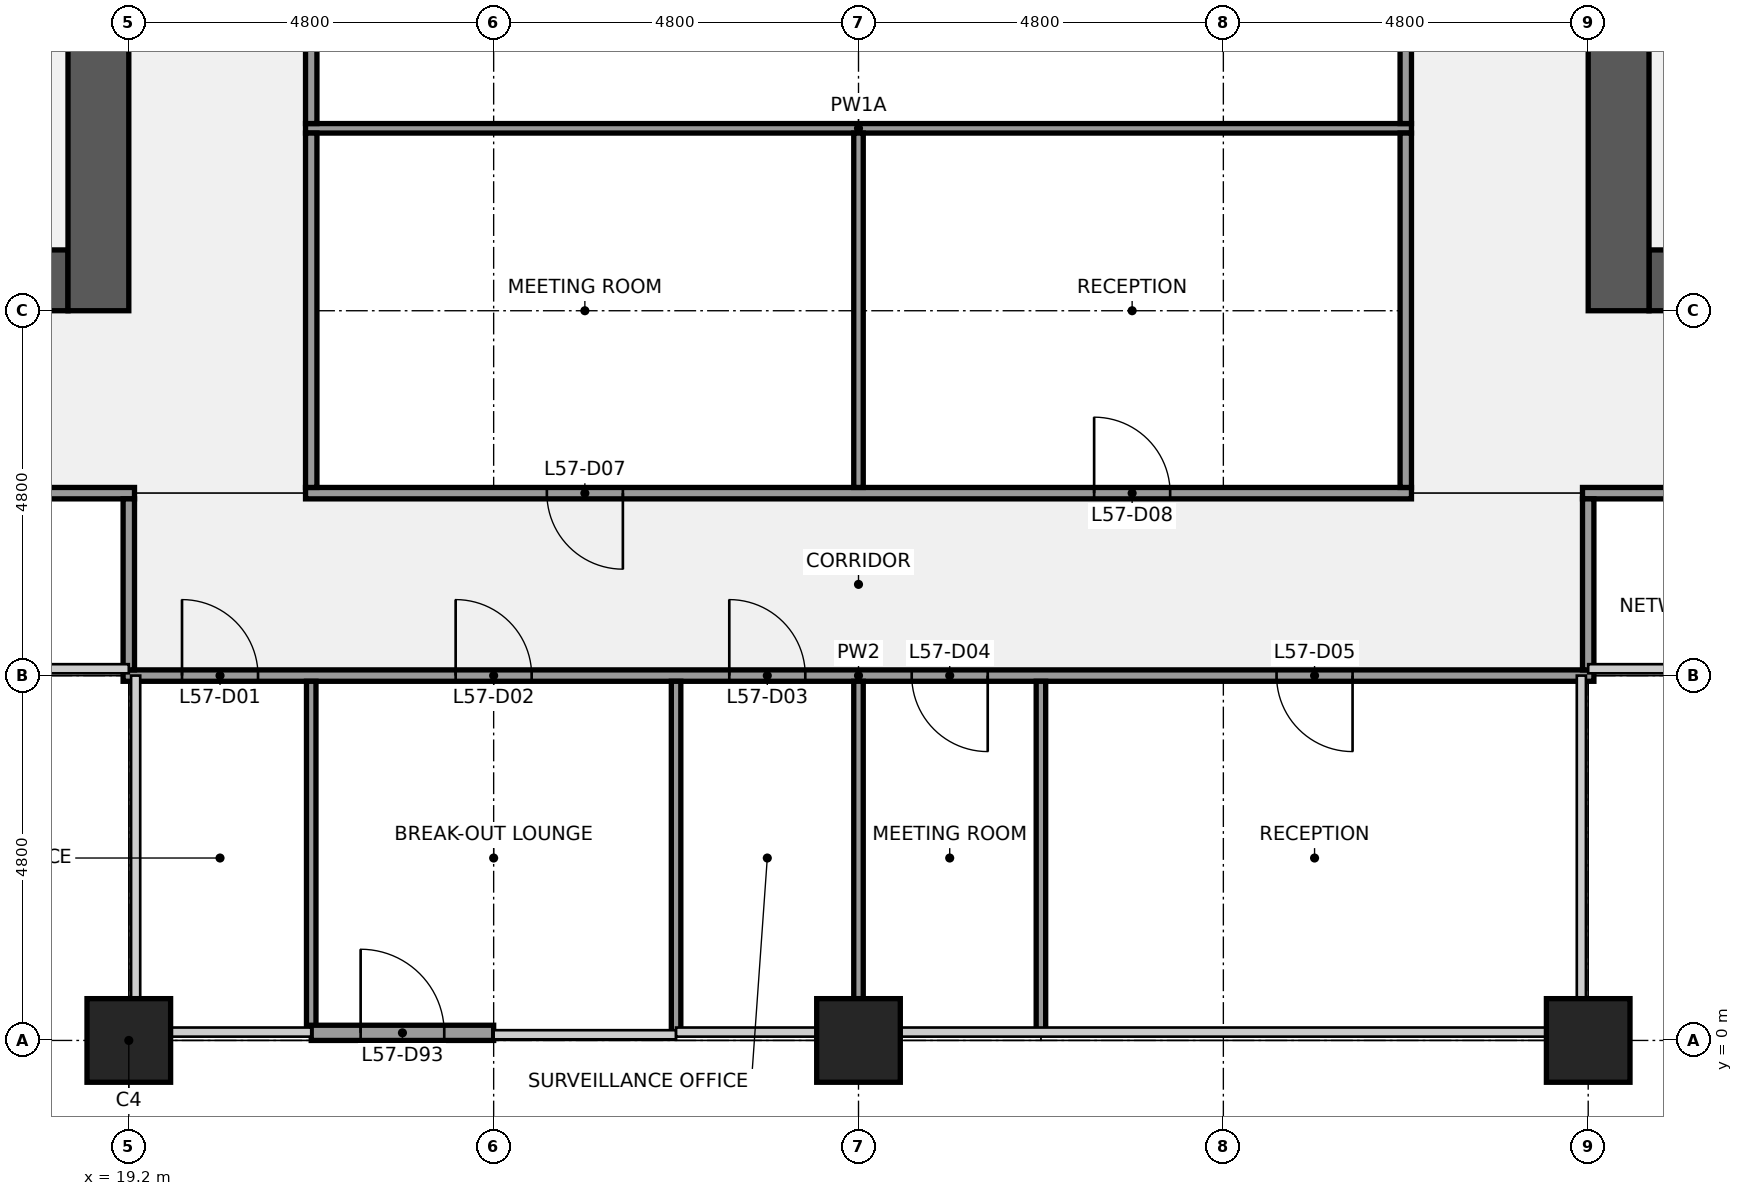
"""IFC4 building model, lengths in metres.
Left out: names, types, materials, properties, quantities, classifications, styles, units other than length and angle.
Written with IfcOpenShell. Run it as: python <this file> out.ifc"""

import sys

from ifc_helpers import new_model, si_unit, direction, frame, frame_2d, origin, origin_2d, place, context, subcontext, project, spatial, rectangle, extrude, element, fill, save


model = new_model("IFC4")
c1 = context("Model", 3, precision=1e-05, world=origin(), true_north=direction((0.0, 1.0)))
c2 = subcontext(c1, "Body", "Model", "MODEL_VIEW")
j1 = project(units=[si_unit("LENGTHUNIT", "METRE"), si_unit("PLANEANGLEUNIT", "RADIAN")], contexts=[c1])
p1 = place(None, origin())
s1 = spatial("IfcSite", under=j1, at=p1, CompositionType="ELEMENT")
p2 = place(p1, origin())
s2 = spatial("IfcBuilding", under=s1, at=p2, CompositionType="ELEMENT")
p3 = place(p2, frame((0.0, 0.0, 257.2)))
s3 = spatial("IfcBuildingStorey", under=s2, at=p3, CompositionType="ELEMENT", Elevation=257.2)
for number, where, z_axis, x_axis in (
    (1, (19.2, 0.0, 0.0), (0.0, 0.0, 1.0), (1.0, 0.0, 0.0)),
    (2, (28.8, 0.0, 0.0), (0.0, 0.0, 1.0), (1.0, 0.0, 0.0)),
    (3, (38.4, 0.0, 0.0), (0.0, 0.0, 1.0), (1.0, 0.0, 0.0)),
):
    element("IfcColumn", number, at=place(p3, frame(where, z_axis=z_axis, x_axis=x_axis)), inside=s3, PredefinedType="COLUMN", context=c2, shape_type="SweptSolid", body=[
        extrude(rectangle(XDim=1.1, YDim=1.1, at=origin_2d()), origin(), (0.0, 0.0, 1.0), 4.0),
    ])
p4 = place(p3, frame((18.4, 10.0, 0.0), z_axis=(0.0, 0.0, 1.0), x_axis=(-1.0, 0.0, 0.0)))
e4 = element("IfcWall", 4, at=p4, inside=s3, PredefinedType="SHEAR", context=c2, shape_type="SweptSolid", body=[
    extrude(rectangle(XDim=4.0, YDim=0.8, at=frame_2d((2.0, 0.0))), origin(), (0.0, 0.0, 1.0), 3.84),
])
p5 = place(p4, frame((1.05, 0.0, 0.0)))
e5 = element("IfcOpeningElement", 5, at=p5, cuts=e4, PredefinedType="OPENING", context=c2, shape_type="SweptSolid", body=[
    extrude(rectangle(XDim=1.1, YDim=2.1, at=frame_2d((0.55, 1.05))), frame((0.0, 0.41, 0.0), z_axis=(0.0, -1.0, 0.0), x_axis=(1.0, 0.0, 0.0)), (0.0, 0.0, 1.0), 0.82),
])
p6 = place(p3, frame((18.8, 38.4, 0.0), z_axis=(0.0, 0.0, 1.0), x_axis=(0.0, -1.0, 0.0)))
e6 = element("IfcWall", 6, at=p6, inside=s3, PredefinedType="SHEAR", context=c2, shape_type="SweptSolid", body=[
    extrude(rectangle(XDim=28.8, YDim=0.8, at=frame_2d((14.4, 0.0))), origin(), (0.0, 0.0, 1.0), 3.84),
])
p7 = place(p6, frame((18.3, 0.0, 0.0)))
e7 = element("IfcOpeningElement", 7, at=p7, cuts=e6, PredefinedType="OPENING", context=c2, shape_type="SweptSolid", body=[
    extrude(rectangle(XDim=1.8, YDim=2.1, at=frame_2d((0.9, 1.05))), frame((0.0, 0.41, 0.0), z_axis=(0.0, -1.0, 0.0), x_axis=(1.0, 0.0, 0.0)), (0.0, 0.0, 1.0), 0.82),
])
p8 = place(p6, frame((8.7, 0.0, 0.0)))
e8 = element("IfcOpeningElement", 8, at=p8, cuts=e6, PredefinedType="OPENING", context=c2, shape_type="SweptSolid", body=[
    extrude(rectangle(XDim=1.8, YDim=2.1, at=frame_2d((0.9, 1.05))), frame((0.0, 0.41, 0.0), z_axis=(0.0, -1.0, 0.0), x_axis=(1.0, 0.0, 0.0)), (0.0, 0.0, 1.0), 0.82),
])
p9 = place(p3, frame((43.2, 10.0, 0.0), z_axis=(0.0, 0.0, 1.0), x_axis=(-1.0, 0.0, 0.0)))
e9 = element("IfcWall", 9, at=p9, inside=s3, PredefinedType="SHEAR", context=c2, shape_type="SweptSolid", body=[
    extrude(rectangle(XDim=4.0, YDim=0.8, at=frame_2d((2.0, 0.0))), origin(), (0.0, 0.0, 1.0), 3.84),
])
p10 = place(p9, frame((1.85, 0.0, 0.0)))
e10 = element("IfcOpeningElement", 10, at=p10, cuts=e9, PredefinedType="OPENING", context=c2, shape_type="SweptSolid", body=[
    extrude(rectangle(XDim=1.1, YDim=2.1, at=frame_2d((0.55, 1.05))), frame((0.0, 0.41, 0.0), z_axis=(0.0, -1.0, 0.0), x_axis=(1.0, 0.0, 0.0)), (0.0, 0.0, 1.0), 0.82),
])
p11 = place(p3, frame((38.8, 9.6, 0.0), z_axis=(0.0, 0.0, 1.0), x_axis=(0.0, 1.0, 0.0)))
e11 = element("IfcWall", 11, at=p11, inside=s3, PredefinedType="SHEAR", context=c2, shape_type="SweptSolid", body=[
    extrude(rectangle(XDim=28.8, YDim=0.8, at=frame_2d((14.4, 0.0))), origin(), (0.0, 0.0, 1.0), 3.84),
])
p12 = place(p11, frame((8.7, 0.0, 0.0)))
e12 = element("IfcOpeningElement", 12, at=p12, cuts=e11, PredefinedType="OPENING", context=c2, shape_type="SweptSolid", body=[
    extrude(rectangle(XDim=1.8, YDim=2.1, at=frame_2d((0.9, 1.05))), frame((0.0, 0.41, 0.0), z_axis=(0.0, -1.0, 0.0), x_axis=(1.0, 0.0, 0.0)), (0.0, 0.0, 1.0), 0.82),
])
p13 = place(p11, frame((18.3, 0.0, 0.0)))
e13 = element("IfcOpeningElement", 13, at=p13, cuts=e11, PredefinedType="OPENING", context=c2, shape_type="SweptSolid", body=[
    extrude(rectangle(XDim=1.8, YDim=2.1, at=frame_2d((0.9, 1.05))), frame((0.0, 0.41, 0.0), z_axis=(0.0, -1.0, 0.0), x_axis=(1.0, 0.0, 0.0)), (0.0, 0.0, 1.0), 0.82),
])
p14 = place(p3, frame((19.125, 4.8, 0.0), z_axis=(0.0, 0.0, 1.0), x_axis=(1.0, 0.0, 0.0)))
e14 = element("IfcWall", 14, at=p14, inside=s3, PredefinedType="PARTITIONING", context=c2, shape_type="SweptSolid", body=[
    extrude(rectangle(XDim=19.35, YDim=0.15, at=frame_2d((9.675, 0.0))), origin(), (0.0, 0.0, 1.0), 2.87),
])
p15 = place(p14, frame((0.775, 0.0, 0.0)))
e15 = element("IfcOpeningElement", 15, at=p15, cuts=e14, PredefinedType="OPENING", context=c2, shape_type="SweptSolid", body=[
    extrude(rectangle(XDim=1.0, YDim=2.1, at=frame_2d((0.5, 1.05))), frame((0.0, 0.085, 0.0), z_axis=(0.0, -1.0, 0.0), x_axis=(1.0, 0.0, 0.0)), (0.0, 0.0, 1.0), 0.17),
])
p16 = place(p14, frame((4.375, 0.0, 0.0)))
e16 = element("IfcOpeningElement", 16, at=p16, cuts=e14, PredefinedType="OPENING", context=c2, shape_type="SweptSolid", body=[
    extrude(rectangle(XDim=1.0, YDim=2.1, at=frame_2d((0.5, 1.05))), frame((0.0, 0.085, 0.0), z_axis=(0.0, -1.0, 0.0), x_axis=(1.0, 0.0, 0.0)), (0.0, 0.0, 1.0), 0.17),
])
p17 = place(p14, frame((7.975, 0.0, 0.0)))
e17 = element("IfcOpeningElement", 17, at=p17, cuts=e14, PredefinedType="OPENING", context=c2, shape_type="SweptSolid", body=[
    extrude(rectangle(XDim=1.0, YDim=2.1, at=frame_2d((0.5, 1.05))), frame((0.0, 0.085, 0.0), z_axis=(0.0, -1.0, 0.0), x_axis=(1.0, 0.0, 0.0)), (0.0, 0.0, 1.0), 0.17),
])
p18 = place(p14, frame((10.375, 0.0, 0.0)))
e18 = element("IfcOpeningElement", 18, at=p18, cuts=e14, PredefinedType="OPENING", context=c2, shape_type="SweptSolid", body=[
    extrude(rectangle(XDim=1.0, YDim=2.1, at=frame_2d((0.5, 1.05))), frame((0.0, 0.085, 0.0), z_axis=(0.0, -1.0, 0.0), x_axis=(1.0, 0.0, 0.0)), (0.0, 0.0, 1.0), 0.17),
])
p19 = place(p14, frame((15.175, 0.0, 0.0)))
e19 = element("IfcOpeningElement", 19, at=p19, cuts=e14, PredefinedType="OPENING", context=c2, shape_type="SweptSolid", body=[
    extrude(rectangle(XDim=1.0, YDim=2.1, at=frame_2d((0.5, 1.05))), frame((0.0, 0.085, 0.0), z_axis=(0.0, -1.0, 0.0), x_axis=(1.0, 0.0, 0.0)), (0.0, 0.0, 1.0), 0.17),
])
p20 = place(p3, frame((14.5, 7.2, 0.0), z_axis=(0.0, 0.0, 1.0), x_axis=(1.0, 0.0, 0.0)))
e20 = element("IfcWall", 20, at=p20, inside=s3, PredefinedType="PARTITIONING", context=c2, shape_type="SweptSolid", body=[
    extrude(rectangle(XDim=4.775, YDim=0.15, at=frame_2d((2.387, 0.0))), origin(), (0.0, 0.0, 1.0), 2.87),
])
p21 = place(p20, frame((1.85, 0.0, 0.0)))
e21 = element("IfcOpeningElement", 21, at=p21, cuts=e20, PredefinedType="OPENING", context=c2, shape_type="SweptSolid", body=[
    extrude(rectangle(XDim=1.0, YDim=2.1, at=frame_2d((0.5, 1.05))), frame((0.0, 0.085, 0.0), z_axis=(0.0, -1.0, 0.0), x_axis=(1.0, 0.0, 0.0)), (0.0, 0.0, 1.0), 0.17),
])
p22 = place(p3, frame((21.525, 7.2, 0.0), z_axis=(0.0, 0.0, 1.0), x_axis=(1.0, 0.0, 0.0)))
e22 = element("IfcWall", 22, at=p22, inside=s3, PredefinedType="PARTITIONING", context=c2, shape_type="SweptSolid", body=[
    extrude(rectangle(XDim=14.55, YDim=0.15, at=frame_2d((7.275, 0.0))), origin(), (0.0, 0.0, 1.0), 2.87),
])
p23 = place(p22, frame((3.175, 0.0, 0.0)))
e23 = element("IfcOpeningElement", 23, at=p23, cuts=e22, PredefinedType="OPENING", context=c2, shape_type="SweptSolid", body=[
    extrude(rectangle(XDim=1.0, YDim=2.1, at=frame_2d((0.5, 1.05))), frame((0.0, 0.085, 0.0), z_axis=(0.0, -1.0, 0.0), x_axis=(1.0, 0.0, 0.0)), (0.0, 0.0, 1.0), 0.17),
])
p24 = place(p22, frame((10.375, 0.0, 0.0)))
e24 = element("IfcOpeningElement", 24, at=p24, cuts=e22, PredefinedType="OPENING", context=c2, shape_type="SweptSolid", body=[
    extrude(rectangle(XDim=1.0, YDim=2.1, at=frame_2d((0.5, 1.05))), frame((0.0, 0.085, 0.0), z_axis=(0.0, -1.0, 0.0), x_axis=(1.0, 0.0, 0.0)), (0.0, 0.0, 1.0), 0.17),
])
p25 = place(p3, frame((38.325, 7.2, 0.0), z_axis=(0.0, 0.0, 1.0), x_axis=(1.0, 0.0, 0.0)))
e25 = element("IfcWall", 25, at=p25, inside=s3, PredefinedType="PARTITIONING", context=c2, shape_type="SweptSolid", body=[
    extrude(rectangle(XDim=4.775, YDim=0.15, at=frame_2d((2.388, 0.0))), origin(), (0.0, 0.0, 1.0), 2.87),
])
p26 = place(p25, frame((1.925, 0.0, 0.0)))
e26 = element("IfcOpeningElement", 26, at=p26, cuts=e25, PredefinedType="OPENING", context=c2, shape_type="SweptSolid", body=[
    extrude(rectangle(XDim=1.0, YDim=2.1, at=frame_2d((0.5, 1.05))), frame((0.0, 0.085, 0.0), z_axis=(0.0, -1.0, 0.0), x_axis=(1.0, 0.0, 0.0)), (0.0, 0.0, 1.0), 0.17),
])
p27 = place(p3, frame((21.525, 12.0, 0.0), z_axis=(0.0, 0.0, 1.0), x_axis=(1.0, 0.0, 0.0)))
e27 = element("IfcWall", 27, at=p27, inside=s3, PredefinedType="PARTITIONING", context=c2, shape_type="SweptSolid", body=[
    extrude(rectangle(XDim=14.55, YDim=0.125, at=frame_2d((7.275, 0.0))), origin(), (0.0, 0.0, 1.0), 2.87),
])
p28 = place(p3, frame((19.2, 4.875, 0.0), z_axis=(0.0, 0.0, 1.0), x_axis=(0.0, 1.0, 0.0)))
e28 = element("IfcWall", 28, at=p28, inside=s3, PredefinedType="PARTITIONING", context=c2, shape_type="SweptSolid", body=[
    extrude(rectangle(XDim=2.25, YDim=0.15, at=frame_2d((1.125, 0.0))), origin(), (0.0, 0.0, 1.0), 2.87),
])
p29 = place(p3, frame((21.6, 0.1, 0.0), z_axis=(0.0, 0.0, 1.0), x_axis=(0.0, 1.0, 0.0)))
e29 = element("IfcWall", 29, at=p29, inside=s3, PredefinedType="PARTITIONING", context=c2, shape_type="SweptSolid", body=[
    extrude(rectangle(XDim=4.625, YDim=0.125, at=frame_2d((2.312, 0.0))), origin(), (0.0, 0.0, 1.0), 2.87),
])
p30 = place(p3, frame((21.6, 7.275, 0.0), z_axis=(0.0, 0.0, 1.0), x_axis=(0.0, 1.0, 0.0)))
e30 = element("IfcWall", 30, at=p30, inside=s3, PredefinedType="PARTITIONING", context=c2, shape_type="SweptSolid", body=[
    extrude(rectangle(XDim=4.663, YDim=0.15, at=frame_2d((2.331, 0.0))), origin(), (0.0, 0.0, 1.0), 2.87),
])
p31 = place(p3, frame((21.6, 12.062, 0.0), z_axis=(0.0, 0.0, 1.0), x_axis=(0.0, 1.0, 0.0)))
e31 = element("IfcWall", 31, at=p31, inside=s3, PredefinedType="PARTITIONING", context=c2, shape_type="SweptSolid", body=[
    extrude(rectangle(XDim=7.075, YDim=0.15, at=frame_2d((3.538, 0.0))), origin(), (0.0, 0.0, 1.0), 2.87),
])
p32 = place(p31, frame((3.038, 0.0, 0.0)))
e32 = element("IfcOpeningElement", 32, at=p32, cuts=e31, PredefinedType="OPENING", context=c2, shape_type="SweptSolid", body=[
    extrude(rectangle(XDim=1.0, YDim=2.1, at=frame_2d((0.5, 1.05))), frame((0.0, 0.085, 0.0), z_axis=(0.0, -1.0, 0.0), x_axis=(1.0, 0.0, 0.0)), (0.0, 0.0, 1.0), 0.17),
])
p33 = place(p3, frame((26.4, 0.1, 0.0), z_axis=(0.0, 0.0, 1.0), x_axis=(0.0, 1.0, 0.0)))
e33 = element("IfcWall", 33, at=p33, inside=s3, PredefinedType="PARTITIONING", context=c2, shape_type="SweptSolid", body=[
    extrude(rectangle(XDim=4.625, YDim=0.125, at=frame_2d((2.312, 0.0))), origin(), (0.0, 0.0, 1.0), 2.87),
])
p34 = place(p3, frame((28.8, 0.55, 0.0), z_axis=(0.0, 0.0, 1.0), x_axis=(0.0, 1.0, 0.0)))
e34 = element("IfcWall", 34, at=p34, inside=s3, PredefinedType="PARTITIONING", context=c2, shape_type="SweptSolid", body=[
    extrude(rectangle(XDim=4.175, YDim=0.125, at=frame_2d((2.087, 0.0))), origin(), (0.0, 0.0, 1.0), 2.87),
])
p35 = place(p3, frame((28.8, 7.275, 0.0), z_axis=(0.0, 0.0, 1.0), x_axis=(0.0, 1.0, 0.0)))
e35 = element("IfcWall", 35, at=p35, inside=s3, PredefinedType="PARTITIONING", context=c2, shape_type="SweptSolid", body=[
    extrude(rectangle(XDim=4.663, YDim=0.125, at=frame_2d((2.331, 0.0))), origin(), (0.0, 0.0, 1.0), 2.87),
])
p36 = place(p3, frame((31.2, 0.1, 0.0), z_axis=(0.0, 0.0, 1.0), x_axis=(0.0, 1.0, 0.0)))
e36 = element("IfcWall", 36, at=p36, inside=s3, PredefinedType="PARTITIONING", context=c2, shape_type="SweptSolid", body=[
    extrude(rectangle(XDim=4.625, YDim=0.125, at=frame_2d((2.312, 0.0))), origin(), (0.0, 0.0, 1.0), 2.87),
])
p37 = place(p3, frame((36.0, 7.275, 0.0), z_axis=(0.0, 0.0, 1.0), x_axis=(0.0, 1.0, 0.0)))
e37 = element("IfcWall", 37, at=p37, inside=s3, PredefinedType="PARTITIONING", context=c2, shape_type="SweptSolid", body=[
    extrude(rectangle(XDim=4.663, YDim=0.15, at=frame_2d((2.331, 0.0))), origin(), (0.0, 0.0, 1.0), 2.87),
])
p38 = place(p3, frame((36.0, 12.062, 0.0), z_axis=(0.0, 0.0, 1.0), x_axis=(0.0, 1.0, 0.0)))
e38 = element("IfcWall", 38, at=p38, inside=s3, PredefinedType="PARTITIONING", context=c2, shape_type="SweptSolid", body=[
    extrude(rectangle(XDim=7.075, YDim=0.15, at=frame_2d((3.538, 0.0))), origin(), (0.0, 0.0, 1.0), 2.87),
])
p39 = place(p3, frame((38.4, 4.875, 0.0), z_axis=(0.0, 0.0, 1.0), x_axis=(0.0, 1.0, 0.0)))
e39 = element("IfcWall", 39, at=p39, inside=s3, PredefinedType="PARTITIONING", context=c2, shape_type="SweptSolid", body=[
    extrude(rectangle(XDim=2.25, YDim=0.15, at=frame_2d((1.125, 0.0))), origin(), (0.0, 0.0, 1.0), 2.87),
])
p40 = place(p3, frame((21.6, 0.1, 0.0), z_axis=(0.0, 0.0, 1.0), x_axis=(1.0, 0.0, 0.0)))
e40 = element("IfcWall", 40, at=p40, inside=s3, PredefinedType="SOLIDWALL", context=c2, shape_type="SweptSolid", body=[
    extrude(rectangle(XDim=2.4, YDim=0.2, at=frame_2d((1.2, 0.0))), origin(), (0.0, 0.0, 1.0), 3.314),
])
p41 = place(p40, frame((0.65, 0.0, 0.0)))
e41 = element("IfcOpeningElement", 41, at=p41, cuts=e40, PredefinedType="OPENING", context=c2, shape_type="SweptSolid", body=[
    extrude(rectangle(XDim=1.1, YDim=2.1, at=frame_2d((0.55, 1.05))), frame((0.0, 0.11, 0.0), z_axis=(0.0, -1.0, 0.0), x_axis=(1.0, 0.0, 0.0)), (0.0, 0.0, 1.0), 0.22),
])
for number, where, z_axis, x_axis in (
    (42, (19.2, -1.025, 0.0), (0.0, 0.0, 1.0), (1.0, 0.0, 0.0)),
    (43, (38.4, -1.025, 0.0), (0.0, 0.0, 1.0), (1.0, 0.0, 0.0)),
):
    element("IfcColumn", number, at=place(p3, frame(where, z_axis=z_axis, x_axis=x_axis)), inside=s3, PredefinedType="PILASTER", context=c2, shape_type="SweptSolid", body=[
        extrude(rectangle(XDim=2.4, YDim=0.95, at=origin_2d()), origin(), (0.0, 0.0, 1.0), 4.0),
    ])
p42 = place(p15, origin())
e44 = element("IfcDoor", 44, at=p42, inside=s3, OperationType="SINGLE_SWING_LEFT", PredefinedType="DOOR", context=c2, shape_type="SweptSolid", body=[
    extrude(rectangle(XDim=1.0, YDim=2.1, at=frame_2d((0.5, 1.05))), frame((0.0, 0.025, 0.0), z_axis=(0.0, -1.0, 0.0), x_axis=(1.0, 0.0, 0.0)), (0.0, 0.0, 1.0), 0.05),
])
fill(e15, e44)
p43 = place(p16, origin())
e45 = element("IfcDoor", 45, at=p43, inside=s3, OperationType="SINGLE_SWING_LEFT", PredefinedType="DOOR", context=c2, shape_type="SweptSolid", body=[
    extrude(rectangle(XDim=1.0, YDim=2.1, at=frame_2d((0.5, 1.05))), frame((0.0, 0.025, 0.0), z_axis=(0.0, -1.0, 0.0), x_axis=(1.0, 0.0, 0.0)), (0.0, 0.0, 1.0), 0.05),
])
fill(e16, e45)
p44 = place(p17, origin())
e46 = element("IfcDoor", 46, at=p44, inside=s3, OperationType="SINGLE_SWING_LEFT", PredefinedType="DOOR", context=c2, shape_type="SweptSolid", body=[
    extrude(rectangle(XDim=1.0, YDim=2.1, at=frame_2d((0.5, 1.05))), frame((0.0, 0.025, 0.0), z_axis=(0.0, -1.0, 0.0), x_axis=(1.0, 0.0, 0.0)), (0.0, 0.0, 1.0), 0.05),
])
fill(e17, e46)
p45 = place(p18, origin())
e47 = element("IfcDoor", 47, at=p45, inside=s3, OperationType="SINGLE_SWING_RIGHT", PredefinedType="DOOR", context=c2, shape_type="SweptSolid", body=[
    extrude(rectangle(XDim=1.0, YDim=2.1, at=frame_2d((0.5, 1.05))), frame((0.0, 0.025, 0.0), z_axis=(0.0, -1.0, 0.0), x_axis=(1.0, 0.0, 0.0)), (0.0, 0.0, 1.0), 0.05),
])
fill(e18, e47)
p46 = place(p19, origin())
e48 = element("IfcDoor", 48, at=p46, inside=s3, OperationType="SINGLE_SWING_RIGHT", PredefinedType="DOOR", context=c2, shape_type="SweptSolid", body=[
    extrude(rectangle(XDim=1.0, YDim=2.1, at=frame_2d((0.5, 1.05))), frame((0.0, 0.025, 0.0), z_axis=(0.0, -1.0, 0.0), x_axis=(1.0, 0.0, 0.0)), (0.0, 0.0, 1.0), 0.05),
])
fill(e19, e48)
p47 = place(p23, origin())
e49 = element("IfcDoor", 49, at=p47, inside=s3, OperationType="SINGLE_SWING_RIGHT", PredefinedType="DOOR", context=c2, shape_type="SweptSolid", body=[
    extrude(rectangle(XDim=1.0, YDim=2.1, at=frame_2d((0.5, 1.05))), frame((0.0, 0.025, 0.0), z_axis=(0.0, -1.0, 0.0), x_axis=(1.0, 0.0, 0.0)), (0.0, 0.0, 1.0), 0.05),
])
fill(e23, e49)
p48 = place(p24, origin())
e50 = element("IfcDoor", 50, at=p48, inside=s3, OperationType="SINGLE_SWING_LEFT", PredefinedType="DOOR", context=c2, shape_type="SweptSolid", body=[
    extrude(rectangle(XDim=1.0, YDim=2.1, at=frame_2d((0.5, 1.05))), frame((0.0, 0.025, 0.0), z_axis=(0.0, -1.0, 0.0), x_axis=(1.0, 0.0, 0.0)), (0.0, 0.0, 1.0), 0.05),
])
fill(e24, e50)
p49 = place(p41, origin())
e51 = element("IfcDoor", 51, at=p49, inside=s3, OperationType="SINGLE_SWING_LEFT", PredefinedType="DOOR", context=c2, shape_type="SweptSolid", body=[
    extrude(rectangle(XDim=1.1, YDim=2.1, at=frame_2d((0.55, 1.05))), frame((0.0, 0.025, 0.0), z_axis=(0.0, -1.0, 0.0), x_axis=(1.0, 0.0, 0.0)), (0.0, 0.0, 1.0), 0.05),
])
fill(e41, e51)
save(model, sys.argv[1])
